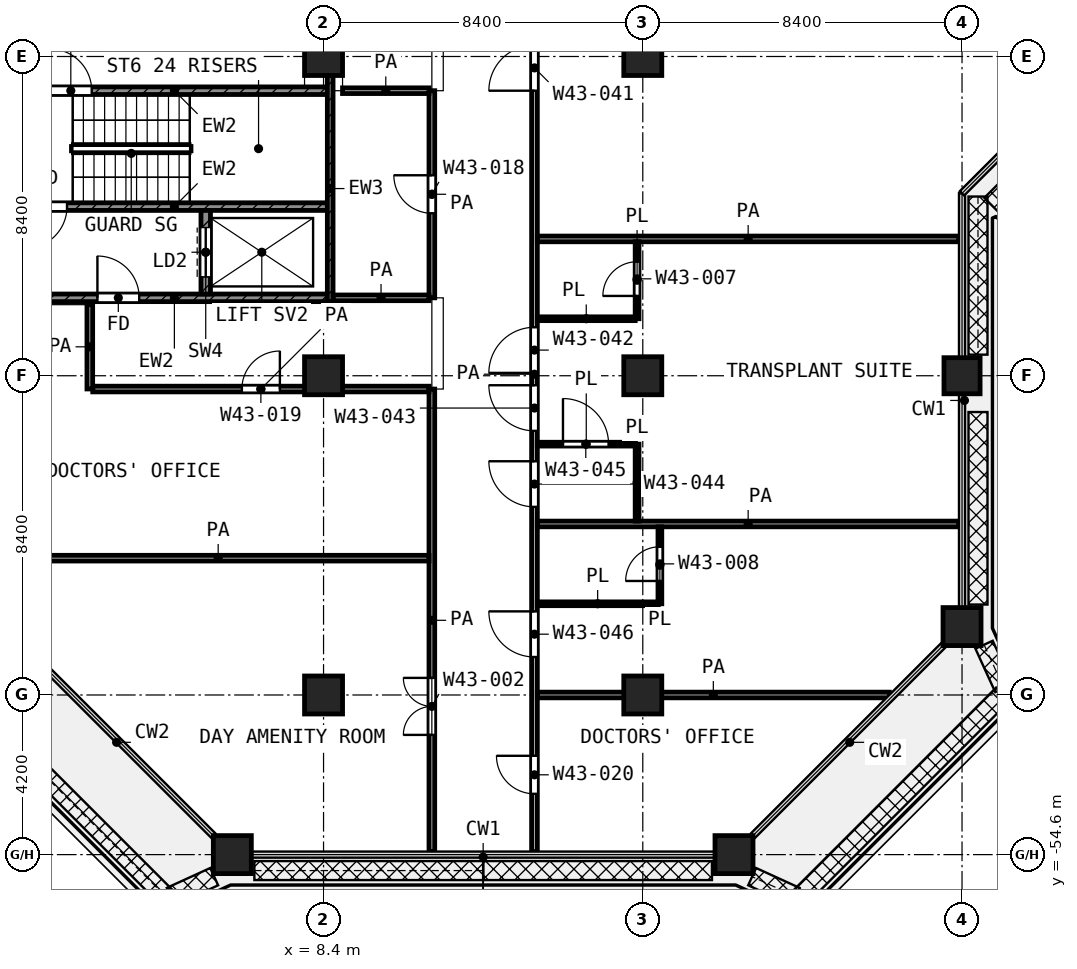
"""IFC4 building model, lengths in metres.
Left out: names, types, materials, properties, quantities, classifications, styles, units other than length and angle.
Written with IfcOpenShell. Run it as: python <this file> out.ifc"""

import sys

from ifc_helpers import new_model, si_unit, direction, frame, frame_2d, origin, origin_2d, place, context, subcontext, project, spatial, rectangle, extrude, element, fill, save


model = new_model("IFC4")
c1 = context("Model", 3, precision=1e-05, world=origin(), true_north=direction((0.0, 1.0)))
c2 = subcontext(c1, "Body", "Model", "MODEL_VIEW")
j1 = project(units=[si_unit("LENGTHUNIT", "METRE"), si_unit("PLANEANGLEUNIT", "RADIAN")], contexts=[c1])
p1 = place(None, origin())
s1 = spatial("IfcSite", under=j1, at=p1, CompositionType="ELEMENT")
p2 = place(p1, origin())
s2 = spatial("IfcBuilding", under=s1, at=p2, CompositionType="ELEMENT")
p3 = place(p2, frame((0.0, 0.0, 187.8)))
s3 = spatial("IfcBuildingStorey", under=s2, at=p3, CompositionType="ELEMENT", Elevation=187.8)
for number, where, z_axis, x_axis in (
    (1, (8.4, -33.6, 0.0), (0.0, 0.0, 1.0), (1.0, 0.0, 0.0)),
    (2, (16.8, -33.6, 0.0), (0.0, 0.0, 1.0), (1.0, 0.0, 0.0)),
    (3, (8.4, -42.0, 0.0), (0.0, 0.0, 1.0), (1.0, 0.0, 0.0)),
    (4, (16.8, -42.0, 0.0), (0.0, 0.0, 1.0), (1.0, 0.0, 0.0)),
):
    element("IfcColumn", number, at=place(p3, frame(where, z_axis=z_axis, x_axis=x_axis)), inside=s3, PredefinedType="COLUMN", context=c2, shape_type="SweptSolid", body=[
        extrude(rectangle(XDim=1.0, YDim=1.0, at=origin_2d()), origin(), (0.0, 0.0, 1.0), 4.2),
    ])
p4 = place(p3, frame((25.2, -42.0, 0.0), z_axis=(0.0, 0.0, 1.0), x_axis=(1.0, 0.0, 0.0)))
e5 = element("IfcColumn", 5, at=p4, inside=s3, PredefinedType="COLUMN", context=c2, shape_type="SweptSolid", body=[
    extrude(rectangle(XDim=0.95, YDim=0.95, at=origin_2d()), origin(), (0.0, 0.0, 1.0), 4.2),
])
for number, where, z_axis, x_axis in (
    (6, (25.2, -48.6, 0.0), (0.0, 0.0, 1.0), (1.0, 0.0, 0.0)),
    (7, (8.4, -50.4, 0.0), (0.0, 0.0, 1.0), (1.0, 0.0, 0.0)),
    (8, (16.8, -50.4, 0.0), (0.0, 0.0, 1.0), (1.0, 0.0, 0.0)),
    (9, (6.0, -54.6, 0.0), (0.0, 0.0, 1.0), (1.0, 0.0, 0.0)),
    (10, (19.2, -54.6, 0.0), (0.0, 0.0, 1.0), (1.0, 0.0, 0.0)),
):
    element("IfcColumn", number, at=place(p3, frame(where, z_axis=z_axis, x_axis=x_axis)), inside=s3, PredefinedType="COLUMN", context=c2, shape_type="SweptSolid", body=[
        extrude(rectangle(XDim=1.0, YDim=1.0, at=origin_2d()), origin(), (0.0, 0.0, 1.0), 4.2),
    ])
p5 = place(p3, frame((8.575, -40.05, 0.0), z_axis=(0.0, 0.0, 1.0), x_axis=(0.0, 1.0, 0.0)))
e11 = element("IfcWall", 11, at=p5, inside=s3, PredefinedType="SHEAR", context=c2, shape_type="SweptSolid", body=[
    extrude(rectangle(XDim=5.95, YDim=0.15, at=frame_2d((2.975, 0.0))), origin(), (0.0, 0.0, 1.0), 3.6),
])
p6 = place(p3, frame((0.45, -34.5, 0.0), z_axis=(0.0, 0.0, 1.0), x_axis=(1.0, 0.0, 0.0)))
e12 = element("IfcWall", 12, at=p6, inside=s3, PredefinedType="SHEAR", context=c2, shape_type="SweptSolid", body=[
    extrude(rectangle(XDim=8.05, YDim=0.2, at=frame_2d((4.025, 0.0))), origin(), (0.0, 0.0, 1.0), 3.6),
])
p7 = place(p6, frame((0.75, 0.0, 0.0)))
e13 = element("IfcOpeningElement", 13, at=p7, cuts=e12, PredefinedType="OPENING", context=c2, shape_type="SweptSolid", body=[
    extrude(rectangle(XDim=1.1, YDim=2.1, at=frame_2d((0.55, 1.05))), frame((0.0, 0.11, 0.0), z_axis=(0.0, -1.0, 0.0), x_axis=(1.0, 0.0, 0.0)), (0.0, 0.0, 1.0), 0.22),
])
p8 = place(p3, frame((0.45, -37.55, 0.0), z_axis=(0.0, 0.0, 1.0), x_axis=(1.0, 0.0, 0.0)))
e14 = element("IfcWall", 14, at=p8, inside=s3, PredefinedType="SHEAR", context=c2, shape_type="SweptSolid", body=[
    extrude(rectangle(XDim=8.05, YDim=0.2, at=frame_2d((4.025, 0.0))), origin(), (0.0, 0.0, 1.0), 3.6),
])
p9 = place(p8, frame((0.1, 0.0, 0.0)))
e15 = element("IfcOpeningElement", 15, at=p9, cuts=e14, PredefinedType="OPENING", context=c2, shape_type="SweptSolid", body=[
    extrude(rectangle(XDim=1.1, YDim=2.1, at=frame_2d((0.55, 1.05))), frame((0.0, 0.11, 0.0), z_axis=(0.0, -1.0, 0.0), x_axis=(1.0, 0.0, 0.0)), (0.0, 0.0, 1.0), 0.22),
])
p10 = place(p3, frame((0.45, -39.95, 0.0), z_axis=(0.0, 0.0, 1.0), x_axis=(1.0, 0.0, 0.0)))
e16 = element("IfcWall", 16, at=p10, inside=s3, PredefinedType="SHEAR", context=c2, shape_type="SweptSolid", body=[
    extrude(rectangle(XDim=8.05, YDim=0.2, at=frame_2d((4.025, 0.0))), origin(), (0.0, 0.0, 1.0), 3.6),
])
p11 = place(p10, frame((2.0, 0.0, 0.0)))
e17 = element("IfcOpeningElement", 17, at=p11, cuts=e16, PredefinedType="OPENING", context=c2, shape_type="SweptSolid", body=[
    extrude(rectangle(XDim=1.1, YDim=2.1, at=frame_2d((0.55, 1.05))), frame((0.0, 0.11, 0.0), z_axis=(0.0, -1.0, 0.0), x_axis=(1.0, 0.0, 0.0)), (0.0, 0.0, 1.0), 0.22),
])
p12 = place(p3, frame((5.3, -39.85, 0.0), z_axis=(0.0, 0.0, 1.0), x_axis=(0.0, 1.0, 0.0)))
e18 = element("IfcWall", 18, at=p12, inside=s3, PredefinedType="SHEAR", context=c2, shape_type="SweptSolid", body=[
    extrude(rectangle(XDim=2.2, YDim=0.25, at=frame_2d((1.1, 0.0))), origin(), (0.0, 0.0, 1.0), 3.6),
])
p13 = place(p12, frame((0.45, 0.0, 0.0)))
e19 = element("IfcOpeningElement", 19, at=p13, cuts=e18, PredefinedType="OPENING", context=c2, shape_type="SweptSolid", body=[
    extrude(rectangle(XDim=1.3, YDim=2.1, at=frame_2d((0.65, 1.05))), frame((0.0, 0.135, 0.0), z_axis=(0.0, -1.0, 0.0), x_axis=(1.0, 0.0, 0.0)), (0.0, 0.0, 1.0), 0.27),
])
p14 = place(p3, frame((14.025, -48.0, 0.0), z_axis=(0.0, 0.0, 1.0), x_axis=(1.0, 0.0, 0.0)))
e20 = element("IfcWall", 20, at=p14, inside=s3, PredefinedType="PARTITIONING", context=c2, shape_type="SweptSolid", body=[
    extrude(rectangle(XDim=3.175, YDim=0.1, at=frame_2d((1.587, 0.0))), origin(), (0.0, 0.0, 1.0), 3.6),
])
p15 = place(p3, frame((14.025, -43.8, 0.0), z_axis=(0.0, 0.0, 1.0), x_axis=(1.0, 0.0, 0.0)))
e21 = element("IfcWall", 21, at=p15, inside=s3, PredefinedType="PARTITIONING", context=c2, shape_type="SweptSolid", body=[
    extrude(rectangle(XDim=2.575, YDim=0.1, at=frame_2d((1.288, 0.0))), origin(), (0.0, 0.0, 1.0), 3.6),
])
p16 = place(p15, frame((0.675, 0.0, 0.0)))
e22 = element("IfcOpeningElement", 22, at=p16, cuts=e21, PredefinedType="OPENING", context=c2, shape_type="SweptSolid", body=[
    extrude(rectangle(XDim=1.2, YDim=2.1, at=frame_2d((0.6, 1.05))), frame((0.0, 0.06, 0.0), z_axis=(0.0, -1.0, 0.0), x_axis=(1.0, 0.0, 0.0)), (0.0, 0.0, 1.0), 0.12),
])
p17 = place(p3, frame((14.025, -40.5, 0.0), z_axis=(0.0, 0.0, 1.0), x_axis=(1.0, 0.0, 0.0)))
e23 = element("IfcWall", 23, at=p17, inside=s3, PredefinedType="PARTITIONING", context=c2, shape_type="SweptSolid", body=[
    extrude(rectangle(XDim=2.575, YDim=0.1, at=frame_2d((1.288, 0.0))), origin(), (0.0, 0.0, 1.0), 3.6),
])
p18 = place(p3, frame((16.65, -45.825, 0.0), z_axis=(0.0, 0.0, 1.0), x_axis=(0.0, 1.0, 0.0)))
e24 = element("IfcWall", 24, at=p18, inside=s3, PredefinedType="PARTITIONING", context=c2, shape_type="SweptSolid", body=[
    extrude(rectangle(XDim=2.025, YDim=0.1, at=frame_2d((1.012, 0.0))), origin(), (0.0, 0.0, 1.0), 3.6),
])
p19 = place(p3, frame((16.65, -40.5, 0.0), z_axis=(0.0, 0.0, 1.0), x_axis=(0.0, 1.0, 0.0)))
e25 = element("IfcWall", 25, at=p19, inside=s3, PredefinedType="PARTITIONING", context=c2, shape_type="SweptSolid", body=[
    extrude(rectangle(XDim=2.025, YDim=0.1, at=frame_2d((1.012, 0.0))), origin(), (0.0, 0.0, 1.0), 3.6),
])
p20 = place(p19, frame((0.6, 0.0, 0.0)))
e26 = element("IfcOpeningElement", 26, at=p20, cuts=e25, PredefinedType="OPENING", context=c2, shape_type="SweptSolid", body=[
    extrude(rectangle(XDim=0.9, YDim=2.1, at=frame_2d((0.45, 1.05))), frame((0.0, 0.06, 0.0), z_axis=(0.0, -1.0, 0.0), x_axis=(1.0, 0.0, 0.0)), (0.0, 0.0, 1.0), 0.12),
])
p21 = place(p3, frame((17.25, -48.0, 0.0), z_axis=(0.0, 0.0, 1.0), x_axis=(0.0, 1.0, 0.0)))
e27 = element("IfcWall", 27, at=p21, inside=s3, PredefinedType="PARTITIONING", context=c2, shape_type="SweptSolid", body=[
    extrude(rectangle(XDim=2.025, YDim=0.1, at=frame_2d((1.012, 0.0))), origin(), (0.0, 0.0, 1.0), 3.6),
])
p22 = place(p21, frame((0.6, 0.0, 0.0)))
e28 = element("IfcOpeningElement", 28, at=p22, cuts=e27, PredefinedType="OPENING", context=c2, shape_type="SweptSolid", body=[
    extrude(rectangle(XDim=0.9, YDim=2.1, at=frame_2d((0.45, 1.05))), frame((0.0, 0.06, 0.0), z_axis=(0.0, -1.0, 0.0), x_axis=(1.0, 0.0, 0.0)), (0.0, 0.0, 1.0), 0.12),
])
p23 = place(p3, frame((14.025, -50.4, 0.0), z_axis=(0.0, 0.0, 1.0), x_axis=(1.0, 0.0, 0.0)))
e29 = element("IfcWall", 29, at=p23, inside=s3, PredefinedType="PARTITIONING", context=c2, shape_type="SweptSolid", body=[
    extrude(rectangle(XDim=9.262, YDim=0.15, at=frame_2d((4.631, 0.0))), origin(), (0.0, 0.0, 1.0), 3.6),
])
p24 = place(p3, frame((0.08, -46.8, 0.0), z_axis=(0.0, 0.0, 1.0), x_axis=(1.0, 0.0, 0.0)))
e30 = element("IfcWall", 30, at=p24, inside=s3, PredefinedType="PARTITIONING", context=c2, shape_type="SweptSolid", body=[
    extrude(rectangle(XDim=11.095, YDim=0.15, at=frame_2d((5.547, 0.0))), origin(), (0.0, 0.0, 1.0), 3.6),
])
p25 = place(p3, frame((14.025, -45.9, 0.0), z_axis=(0.0, 0.0, 1.0), x_axis=(1.0, 0.0, 0.0)))
e31 = element("IfcWall", 31, at=p25, inside=s3, PredefinedType="PARTITIONING", context=c2, shape_type="SweptSolid", body=[
    extrude(rectangle(XDim=11.095, YDim=0.15, at=frame_2d((5.548, 0.0))), origin(), (0.0, 0.0, 1.0), 3.6),
])
p26 = place(p3, frame((2.327, -42.35, 0.0), z_axis=(0.0, 0.0, 1.0), x_axis=(1.0, 0.0, 0.0)))
e32 = element("IfcWall", 32, at=p26, inside=s3, PredefinedType="PARTITIONING", context=c2, shape_type="SweptSolid", body=[
    extrude(rectangle(XDim=8.848, YDim=0.15, at=frame_2d((4.424, 0.0))), origin(), (0.0, 0.0, 1.0), 3.6),
])
p27 = place(p26, frame((3.924, 0.0, 0.0)))
e33 = element("IfcOpeningElement", 33, at=p27, cuts=e32, PredefinedType="OPENING", context=c2, shape_type="SweptSolid", body=[
    extrude(rectangle(XDim=1.0, YDim=2.1, at=frame_2d((0.5, 1.05))), frame((0.0, 0.085, 0.0), z_axis=(0.0, -1.0, 0.0), x_axis=(1.0, 0.0, 0.0)), (0.0, 0.0, 1.0), 0.17),
])
p28 = place(p3, frame((8.65, -39.95, 0.0), z_axis=(0.0, 0.0, 1.0), x_axis=(1.0, 0.0, 0.0)))
e34 = element("IfcWall", 34, at=p28, inside=s3, PredefinedType="PARTITIONING", context=c2, shape_type="SweptSolid", body=[
    extrude(rectangle(XDim=2.525, YDim=0.15, at=frame_2d((1.263, 0.0))), origin(), (0.0, 0.0, 1.0), 3.6),
])
p29 = place(p3, frame((14.025, -38.4, 0.0), z_axis=(0.0, 0.0, 1.0), x_axis=(1.0, 0.0, 0.0)))
e35 = element("IfcWall", 35, at=p29, inside=s3, PredefinedType="PARTITIONING", context=c2, shape_type="SweptSolid", body=[
    extrude(rectangle(XDim=11.095, YDim=0.15, at=frame_2d((5.548, 0.0))), origin(), (0.0, 0.0, 1.0), 3.6),
])
p30 = place(p3, frame((8.9, -34.5, 0.0), z_axis=(0.0, 0.0, 1.0), x_axis=(1.0, 0.0, 0.0)))
e36 = element("IfcWall", 36, at=p30, inside=s3, PredefinedType="PARTITIONING", context=c2, shape_type="SweptSolid", body=[
    extrude(rectangle(XDim=2.275, YDim=0.15, at=frame_2d((1.138, 0.0))), origin(), (0.0, 0.0, 1.0), 3.6),
])
p31 = place(p3, frame((2.25, -42.348, 0.0), z_axis=(0.0, 0.0, 1.0), x_axis=(0.0, 1.0, 0.0)))
e37 = element("IfcWall", 37, at=p31, inside=s3, PredefinedType="PARTITIONING", context=c2, shape_type="SweptSolid", body=[
    extrude(rectangle(XDim=2.218, YDim=0.15, at=frame_2d((1.109, 0.0))), origin(), (0.0, 0.0, 1.0), 3.6),
])
p32 = place(p3, frame((11.25, -54.52, 0.0), z_axis=(0.0, 0.0, 1.0), x_axis=(0.0, 1.0, 0.0)))
e38 = element("IfcWall", 38, at=p32, inside=s3, PredefinedType="PARTITIONING", context=c2, shape_type="SweptSolid", body=[
    extrude(rectangle(XDim=12.17, YDim=0.15, at=frame_2d((6.085, 0.0))), origin(), (0.0, 0.0, 1.0), 3.6),
])
p33 = place(p32, frame((3.07, 0.0, 0.0)))
e39 = element("IfcOpeningElement", 39, at=p33, cuts=e38, PredefinedType="OPENING", context=c2, shape_type="SweptSolid", body=[
    extrude(rectangle(XDim=1.5, YDim=2.1, at=frame_2d((0.75, 1.05))), frame((0.0, 0.085, 0.0), z_axis=(0.0, -1.0, 0.0), x_axis=(1.0, 0.0, 0.0)), (0.0, 0.0, 1.0), 0.17),
])
p34 = place(p3, frame((11.25, -39.95, 0.0), z_axis=(0.0, 0.0, 1.0), x_axis=(0.0, 1.0, 0.0)))
e40 = element("IfcWall", 40, at=p34, inside=s3, PredefinedType="PARTITIONING", context=c2, shape_type="SweptSolid", body=[
    extrude(rectangle(XDim=5.45, YDim=0.15, at=frame_2d((2.725, 0.0))), origin(), (0.0, 0.0, 1.0), 3.6),
])
p35 = place(p34, frame((2.225, 0.0, 0.0)))
e41 = element("IfcOpeningElement", 41, at=p35, cuts=e40, PredefinedType="OPENING", context=c2, shape_type="SweptSolid", body=[
    extrude(rectangle(XDim=1.0, YDim=2.1, at=frame_2d((0.5, 1.05))), frame((0.0, 0.085, 0.0), z_axis=(0.0, -1.0, 0.0), x_axis=(1.0, 0.0, 0.0)), (0.0, 0.0, 1.0), 0.17),
])
p36 = place(p3, frame((13.95, -54.52, 0.0), z_axis=(0.0, 0.0, 1.0), x_axis=(0.0, 1.0, 0.0)))
e42 = element("IfcWall", 42, at=p36, inside=s3, PredefinedType="PARTITIONING", context=c2, shape_type="SweptSolid", body=[
    extrude(rectangle(XDim=25.12, YDim=0.15, at=frame_2d((12.56, 0.0))), origin(), (0.0, 0.0, 1.0), 3.6),
])
p37 = place(p36, frame((20.02, 0.0, 0.0)))
e43 = element("IfcOpeningElement", 43, at=p37, cuts=e42, PredefinedType="OPENING", context=c2, shape_type="SweptSolid", body=[
    extrude(rectangle(XDim=1.2, YDim=2.1, at=frame_2d((0.6, 1.05))), frame((0.0, 0.085, 0.0), z_axis=(0.0, -1.0, 0.0), x_axis=(1.0, 0.0, 0.0)), (0.0, 0.0, 1.0), 0.17),
])
p38 = place(p36, frame((12.595, 0.0, 0.0)))
e44 = element("IfcOpeningElement", 44, at=p38, cuts=e42, PredefinedType="OPENING", context=c2, shape_type="SweptSolid", body=[
    extrude(rectangle(XDim=1.2, YDim=2.1, at=frame_2d((0.6, 1.05))), frame((0.0, 0.085, 0.0), z_axis=(0.0, -1.0, 0.0), x_axis=(1.0, 0.0, 0.0)), (0.0, 0.0, 1.0), 0.17),
])
p39 = place(p36, frame((11.07, 0.0, 0.0)))
e45 = element("IfcOpeningElement", 45, at=p39, cuts=e42, PredefinedType="OPENING", context=c2, shape_type="SweptSolid", body=[
    extrude(rectangle(XDim=1.2, YDim=2.1, at=frame_2d((0.6, 1.05))), frame((0.0, 0.085, 0.0), z_axis=(0.0, -1.0, 0.0), x_axis=(1.0, 0.0, 0.0)), (0.0, 0.0, 1.0), 0.17),
])
p40 = place(p36, frame((9.07, 0.0, 0.0)))
e46 = element("IfcOpeningElement", 46, at=p40, cuts=e42, PredefinedType="OPENING", context=c2, shape_type="SweptSolid", body=[
    extrude(rectangle(XDim=1.2, YDim=2.1, at=frame_2d((0.6, 1.05))), frame((0.0, 0.085, 0.0), z_axis=(0.0, -1.0, 0.0), x_axis=(1.0, 0.0, 0.0)), (0.0, 0.0, 1.0), 0.17),
])
p41 = place(p36, frame((5.12, 0.0, 0.0)))
e47 = element("IfcOpeningElement", 47, at=p41, cuts=e42, PredefinedType="OPENING", context=c2, shape_type="SweptSolid", body=[
    extrude(rectangle(XDim=1.2, YDim=2.1, at=frame_2d((0.6, 1.05))), frame((0.0, 0.085, 0.0), z_axis=(0.0, -1.0, 0.0), x_axis=(1.0, 0.0, 0.0)), (0.0, 0.0, 1.0), 0.17),
])
p42 = place(p36, frame((1.52, 0.0, 0.0)))
e48 = element("IfcOpeningElement", 48, at=p42, cuts=e42, PredefinedType="OPENING", context=c2, shape_type="SweptSolid", body=[
    extrude(rectangle(XDim=1.0, YDim=2.1, at=frame_2d((0.5, 1.05))), frame((0.0, 0.085, 0.0), z_axis=(0.0, -1.0, 0.0), x_axis=(1.0, 0.0, 0.0)), (0.0, 0.0, 1.0), 0.17),
])
p43 = place(p7, origin())
e49 = element("IfcDoor", 49, at=p43, inside=s3, OperationType="SINGLE_SWING_LEFT", PredefinedType="DOOR", context=c2, shape_type="SweptSolid", body=[
    extrude(rectangle(XDim=1.1, YDim=2.1, at=frame_2d((0.55, 1.05))), frame((0.0, 0.025, 0.0), z_axis=(0.0, -1.0, 0.0), x_axis=(1.0, 0.0, 0.0)), (0.0, 0.0, 1.0), 0.05),
])
fill(e13, e49)
p44 = place(p9, frame((1.1, 0.0, 0.0), z_axis=(0.0, 0.0, 1.0), x_axis=(-1.0, 0.0, 0.0)))
e50 = element("IfcDoor", 50, at=p44, inside=s3, OperationType="SINGLE_SWING_LEFT", PredefinedType="DOOR", context=c2, shape_type="SweptSolid", body=[
    extrude(rectangle(XDim=1.1, YDim=2.1, at=frame_2d((0.55, 1.05))), frame((0.0, 0.025, 0.0), z_axis=(0.0, -1.0, 0.0), x_axis=(1.0, 0.0, 0.0)), (0.0, 0.0, 1.0), 0.05),
])
fill(e15, e50)
p45 = place(p13, origin())
e51 = element("IfcDoor", 51, at=p45, inside=s3, OperationType="DOUBLE_DOOR_SLIDING", PredefinedType="DOOR", context=c2, shape_type="SweptSolid", body=[
    extrude(rectangle(XDim=1.3, YDim=2.1, at=frame_2d((0.65, 1.05))), frame((0.0, 0.025, 0.0), z_axis=(0.0, -1.0, 0.0), x_axis=(1.0, 0.0, 0.0)), (0.0, 0.0, 1.0), 0.05),
])
fill(e19, e51)
p46 = place(p11, origin())
e52 = element("IfcDoor", 52, at=p46, inside=s3, OperationType="SINGLE_SWING_LEFT", PredefinedType="DOOR", context=c2, shape_type="SweptSolid", body=[
    extrude(rectangle(XDim=1.1, YDim=2.1, at=frame_2d((0.55, 1.05))), frame((0.0, 0.025, 0.0), z_axis=(0.0, -1.0, 0.0), x_axis=(1.0, 0.0, 0.0)), (0.0, 0.0, 1.0), 0.05),
])
fill(e17, e52)
p47 = place(p35, origin())
e53 = element("IfcDoor", 53, at=p47, inside=s3, OperationType="SINGLE_SWING_RIGHT", PredefinedType="DOOR", context=c2, shape_type="SweptSolid", body=[
    extrude(rectangle(XDim=1.0, YDim=2.1, at=frame_2d((0.5, 1.05))), frame((0.0, 0.025, 0.0), z_axis=(0.0, -1.0, 0.0), x_axis=(1.0, 0.0, 0.0)), (0.0, 0.0, 1.0), 0.05),
])
fill(e41, e53)
p48 = place(p27, origin())
e54 = element("IfcDoor", 54, at=p48, inside=s3, OperationType="SINGLE_SWING_RIGHT", PredefinedType="DOOR", context=c2, shape_type="SweptSolid", body=[
    extrude(rectangle(XDim=1.0, YDim=2.1, at=frame_2d((0.5, 1.05))), frame((0.0, 0.025, 0.0), z_axis=(0.0, -1.0, 0.0), x_axis=(1.0, 0.0, 0.0)), (0.0, 0.0, 1.0), 0.05),
])
fill(e33, e54)
p49 = place(p33, origin())
e55 = element("IfcDoor", 55, at=p49, inside=s3, OperationType="DOUBLE_DOOR_SINGLE_SWING", PredefinedType="DOOR", context=c2, shape_type="SweptSolid", body=[
    extrude(rectangle(XDim=1.5, YDim=2.1, at=frame_2d((0.75, 1.05))), frame((0.0, 0.025, 0.0), z_axis=(0.0, -1.0, 0.0), x_axis=(1.0, 0.0, 0.0)), (0.0, 0.0, 1.0), 0.05),
])
fill(e39, e55)
p50 = place(p37, origin())
e56 = element("IfcDoor", 56, at=p50, inside=s3, OperationType="SINGLE_SWING_LEFT", PredefinedType="DOOR", context=c2, shape_type="SweptSolid", body=[
    extrude(rectangle(XDim=1.2, YDim=2.1, at=frame_2d((0.6, 1.05))), frame((0.0, 0.025, 0.0), z_axis=(0.0, -1.0, 0.0), x_axis=(1.0, 0.0, 0.0)), (0.0, 0.0, 1.0), 0.05),
])
fill(e43, e56)
p51 = place(p38, origin())
e57 = element("IfcDoor", 57, at=p51, inside=s3, OperationType="SINGLE_SWING_LEFT", PredefinedType="DOOR", context=c2, shape_type="SweptSolid", body=[
    extrude(rectangle(XDim=1.2, YDim=2.1, at=frame_2d((0.6, 1.05))), frame((0.0, 0.025, 0.0), z_axis=(0.0, -1.0, 0.0), x_axis=(1.0, 0.0, 0.0)), (0.0, 0.0, 1.0), 0.05),
])
fill(e44, e57)
p52 = place(p39, origin())
e58 = element("IfcDoor", 58, at=p52, inside=s3, OperationType="SINGLE_SWING_RIGHT", PredefinedType="DOOR", context=c2, shape_type="SweptSolid", body=[
    extrude(rectangle(XDim=1.2, YDim=2.1, at=frame_2d((0.6, 1.05))), frame((0.0, 0.025, 0.0), z_axis=(0.0, -1.0, 0.0), x_axis=(1.0, 0.0, 0.0)), (0.0, 0.0, 1.0), 0.05),
])
fill(e45, e58)
p53 = place(p40, origin())
e59 = element("IfcDoor", 59, at=p53, inside=s3, OperationType="SINGLE_SWING_RIGHT", PredefinedType="DOOR", context=c2, shape_type="SweptSolid", body=[
    extrude(rectangle(XDim=1.2, YDim=2.1, at=frame_2d((0.6, 1.05))), frame((0.0, 0.025, 0.0), z_axis=(0.0, -1.0, 0.0), x_axis=(1.0, 0.0, 0.0)), (0.0, 0.0, 1.0), 0.05),
])
fill(e46, e59)
p54 = place(p16, origin())
e60 = element("IfcDoor", 60, at=p54, inside=s3, OperationType="SINGLE_SWING_LEFT", PredefinedType="DOOR", context=c2, shape_type="SweptSolid", body=[
    extrude(rectangle(XDim=1.2, YDim=2.1, at=frame_2d((0.6, 1.05))), frame((0.0, 0.025, 0.0), z_axis=(0.0, -1.0, 0.0), x_axis=(1.0, 0.0, 0.0)), (0.0, 0.0, 1.0), 0.05),
])
fill(e22, e60)
p55 = place(p20, origin())
e61 = element("IfcDoor", 61, at=p55, inside=s3, OperationType="SINGLE_SWING_LEFT", PredefinedType="DOOR", context=c2, shape_type="SweptSolid", body=[
    extrude(rectangle(XDim=0.9, YDim=2.1, at=frame_2d((0.45, 1.05))), frame((0.0, 0.025, 0.0), z_axis=(0.0, -1.0, 0.0), x_axis=(1.0, 0.0, 0.0)), (0.0, 0.0, 1.0), 0.05),
])
fill(e26, e61)
p56 = place(p41, origin())
e62 = element("IfcDoor", 62, at=p56, inside=s3, OperationType="SINGLE_SWING_RIGHT", PredefinedType="DOOR", context=c2, shape_type="SweptSolid", body=[
    extrude(rectangle(XDim=1.2, YDim=2.1, at=frame_2d((0.6, 1.05))), frame((0.0, 0.025, 0.0), z_axis=(0.0, -1.0, 0.0), x_axis=(1.0, 0.0, 0.0)), (0.0, 0.0, 1.0), 0.05),
])
fill(e47, e62)
p57 = place(p22, origin())
e63 = element("IfcDoor", 63, at=p57, inside=s3, OperationType="SINGLE_SWING_LEFT", PredefinedType="DOOR", context=c2, shape_type="SweptSolid", body=[
    extrude(rectangle(XDim=0.9, YDim=2.1, at=frame_2d((0.45, 1.05))), frame((0.0, 0.025, 0.0), z_axis=(0.0, -1.0, 0.0), x_axis=(1.0, 0.0, 0.0)), (0.0, 0.0, 1.0), 0.05),
])
fill(e28, e63)
p58 = place(p42, origin())
e64 = element("IfcDoor", 64, at=p58, inside=s3, OperationType="SINGLE_SWING_RIGHT", PredefinedType="DOOR", context=c2, shape_type="SweptSolid", body=[
    extrude(rectangle(XDim=1.0, YDim=2.1, at=frame_2d((0.5, 1.05))), frame((0.0, 0.025, 0.0), z_axis=(0.0, -1.0, 0.0), x_axis=(1.0, 0.0, 0.0)), (0.0, 0.0, 1.0), 0.05),
])
fill(e48, e64)
save(model, sys.argv[1])
